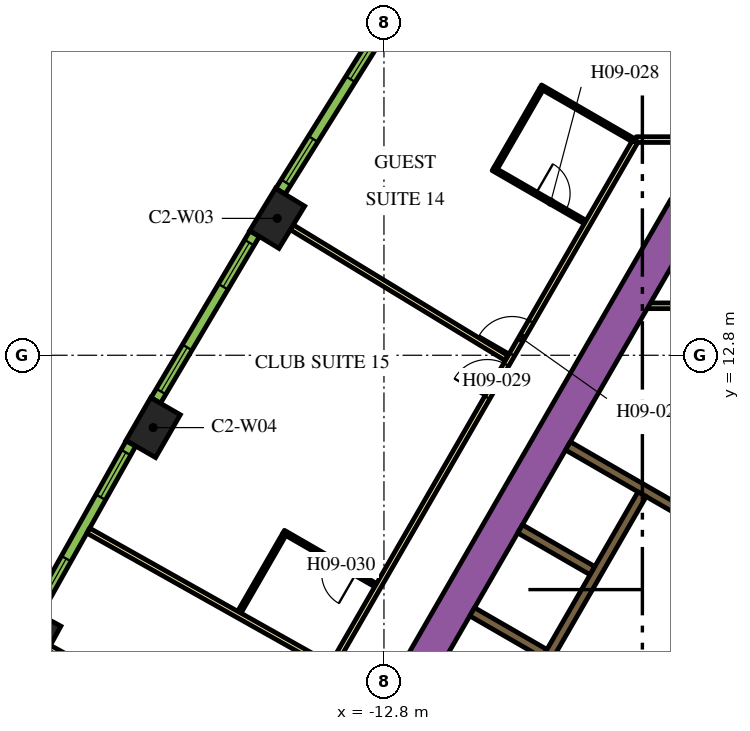
"""IFC4 building model, lengths in metres.
Left out: names, types, materials, properties, quantities, classifications, styles, units other than length and angle.
Written with IfcOpenShell. Run it as: python <this file> out.ifc"""

import sys

from ifc_helpers import new_model, si_unit, direction, frame, frame_2d, origin, origin_2d, place, context, subcontext, project, spatial, rectangle, extrude, element, fill, save


model = new_model("IFC4")
c1 = context("Model", 3, precision=1e-05, world=origin(), true_north=direction((0.0, 1.0)))
c2 = subcontext(c1, "Body", "Model", "MODEL_VIEW")
j1 = project(units=[si_unit("LENGTHUNIT", "METRE"), si_unit("PLANEANGLEUNIT", "RADIAN")], contexts=[c1])
p1 = place(None, origin())
s1 = spatial("IfcSite", under=j1, at=p1, CompositionType="ELEMENT")
p2 = place(p1, origin())
s2 = spatial("IfcBuilding", under=s1, at=p2, CompositionType="ELEMENT")
p3 = place(p2, frame((0.0, 0.0, 126.6)))
s3 = spatial("IfcBuildingStorey", under=s2, at=p3, CompositionType="ELEMENT", Elevation=126.6)
for number, where, z_axis, x_axis in (
    (1, (-15.609, 16.402, 0.0), (0.0, 0.0, 1.0), (-0.52, -0.854, 0.0)),
    (2, (-18.874, 10.897, 0.0), (0.0, 0.0, 1.0), (-0.5, -0.866, 0.0)),
    (3, (-22.009, 5.317, 0.0), (0.0, 0.0, 1.0), (-0.48, -0.877, 0.0)),
):
    element("IfcColumn", number, at=place(p3, frame(where, z_axis=z_axis, x_axis=x_axis)), inside=s3, PredefinedType="COLUMN", context=c2, shape_type="SweptSolid", body=[
        extrude(rectangle(XDim=1.3, YDim=0.9, at=origin_2d()), origin(), (0.0, 0.0, 1.0), 3.9),
    ])
p4 = place(p3, frame((-14.268, 0.387, 0.0), z_axis=(0.0, 0.0, 1.0), x_axis=(0.499994617707, 0.866028511231, 0.0)))
e4 = element("IfcWall", 4, at=p4, inside=s3, PredefinedType="SOLIDWALL", context=c2, shape_type="SweptSolid", body=[
    extrude(rectangle(XDim=18.817, YDim=0.9, at=frame_2d((9.409, 0.0))), origin(), (0.0, 0.0, 1.0), 3.9),
])
p5 = place(p3, frame((-8.06, -1.311, 0.0), z_axis=(0.0, 0.0, 1.0), x_axis=(0.50000273126, 0.866023826885, 0.0)))
e5 = element("IfcWall", 5, at=p5, inside=s3, PredefinedType="SOLIDWALL", context=c2, shape_type="SweptSolid", body=[
    extrude(rectangle(XDim=10.33, YDim=0.25, at=frame_2d((5.165, 0.0))), origin(), (0.0, 0.0, 1.0), 3.9),
])
for number, where, z_axis, x_axis in (
    (6, (-8.574, 4.95, 0.0), (0.0, 0.0, 1.0), (-0.866, 0.5, 0.0)),
    (7, (-7.314, 7.132, 0.0), (0.0, 0.0, 1.0), (-0.866, 0.5, 0.0)),
):
    element("IfcWall", number, at=place(p3, frame(where, z_axis=z_axis, x_axis=x_axis)), inside=s3, PredefinedType="SOLIDWALL", context=c2, shape_type="SweptSolid", body=[
        extrude(rectangle(XDim=2.2, YDim=0.25, at=frame_2d((1.1, 0.0))), origin(), (0.0, 0.0, 1.0), 3.9),
    ])
p6 = place(p3, frame((-7.959, 10.415, 0.0), z_axis=(0.0, 0.0, 1.0), x_axis=(0.866020958405, -0.500007699544, 0.0)))
e8 = element("IfcWall", 8, at=p6, inside=s3, PredefinedType="SOLIDWALL", context=c2, shape_type="SweptSolid", body=[
    extrude(rectangle(XDim=4.1, YDim=0.25, at=frame_2d((2.05, 0.0))), origin(), (0.0, 0.0, 1.0), 3.9),
])
p7 = place(p3, frame((-5.851, 14.102, 0.0), z_axis=(0.0, 0.0, 1.0), x_axis=(1.0, 0.0, 0.0)))
e9 = element("IfcWall", 9, at=p7, inside=s3, PredefinedType="PARTITIONING", context=c2, shape_type="SweptSolid", body=[
    extrude(rectangle(XDim=1.18, YDim=0.15, at=frame_2d((0.59, 0.0))), origin(), (0.0, 0.0, 1.0), 2.75),
])
p8 = place(p3, frame((-6.008, 9.144, 0.0), z_axis=(0.0, 0.0, 1.0), x_axis=(-0.500006956611, -0.866021387346, 0.0)))
e10 = element("IfcWall", 10, at=p8, inside=s3, PredefinedType="SOLIDWALL", context=c2, shape_type="SweptSolid", body=[
    extrude(rectangle(XDim=9.83, YDim=0.25, at=frame_2d((4.915, 0.0))), origin(), (0.0, 0.0, 1.0), 3.9),
])
p9 = place(p8, frame((6.985, 0.0, 0.0)))
e11 = element("IfcOpeningElement", 11, at=p9, cuts=e10, PredefinedType="OPENING", context=c2, shape_type="SweptSolid", body=[
    extrude(rectangle(XDim=0.9, YDim=2.1, at=frame_2d((0.45, 1.05))), frame((0.0, 0.135, 0.0), z_axis=(0.0, -1.0, 0.0), x_axis=(1.0, 0.0, 0.0)), (0.0, 0.0, 1.0), 0.27),
])
p10 = place(p3, frame((-0.898, 6.194, 0.0), z_axis=(0.0, 0.0, 1.0), x_axis=(-0.499996202215, -0.866027596426, 0.0)))
e12 = element("IfcWall", 12, at=p10, inside=s3, PredefinedType="SOLIDWALL", context=c2, shape_type="SweptSolid", body=[
    extrude(rectangle(XDim=9.83, YDim=0.25, at=frame_2d((4.915, 0.0))), origin(), (0.0, 0.0, 1.0), 3.9),
])
p11 = place(p10, frame((0.585, 0.0, 0.0)))
e13 = element("IfcOpeningElement", 13, at=p11, cuts=e12, PredefinedType="OPENING", context=c2, shape_type="SweptSolid", body=[
    extrude(rectangle(XDim=1.1, YDim=2.1, at=frame_2d((0.55, 1.05))), frame((0.0, 0.135, 0.0), z_axis=(0.0, -1.0, 0.0), x_axis=(1.0, 0.0, 0.0)), (0.0, 0.0, 1.0), 0.27),
])
p12 = place(p10, frame((3.105, 0.0, 0.0)))
e14 = element("IfcOpeningElement", 14, at=p12, cuts=e12, PredefinedType="OPENING", context=c2, shape_type="SweptSolid", body=[
    extrude(rectangle(XDim=1.1, YDim=2.1, at=frame_2d((0.55, 1.05))), frame((0.0, 0.135, 0.0), z_axis=(0.0, -1.0, 0.0), x_axis=(1.0, 0.0, 0.0)), (0.0, 0.0, 1.0), 0.27),
])
p13 = place(p10, frame((5.625, 0.0, 0.0)))
e15 = element("IfcOpeningElement", 15, at=p13, cuts=e12, PredefinedType="OPENING", context=c2, shape_type="SweptSolid", body=[
    extrude(rectangle(XDim=1.1, YDim=2.1, at=frame_2d((0.55, 1.05))), frame((0.0, 0.135, 0.0), z_axis=(0.0, -1.0, 0.0), x_axis=(1.0, 0.0, 0.0)), (0.0, 0.0, 1.0), 0.27),
])
p14 = place(p10, frame((8.145, 0.0, 0.0)))
e16 = element("IfcOpeningElement", 16, at=p14, cuts=e12, PredefinedType="OPENING", context=c2, shape_type="SweptSolid", body=[
    extrude(rectangle(XDim=1.1, YDim=2.1, at=frame_2d((0.55, 1.05))), frame((0.0, 0.135, 0.0), z_axis=(0.0, -1.0, 0.0), x_axis=(1.0, 0.0, 0.0)), (0.0, 0.0, 1.0), 0.27),
])
p15 = place(p3, frame((-6.163, 18.475, 0.0), z_axis=(0.0, 0.0, 1.0), x_axis=(1.0, 0.0, 0.0)))
e17 = element("IfcWall", 17, at=p15, inside=s3, PredefinedType="PARTITIONING", context=c2, shape_type="SweptSolid", body=[
    extrude(rectangle(XDim=5.258, YDim=0.15, at=frame_2d((2.629, 0.0))), origin(), (0.0, 0.0, 1.0), 2.75),
])
p16 = place(p3, frame((-19.081, -3.9, 0.0), z_axis=(0.0, 0.0, 1.0), x_axis=(0.499998313975, 0.866026377209, 0.0)))
e18 = element("IfcWall", 18, at=p16, inside=s3, PredefinedType="PARTITIONING", context=c2, shape_type="SweptSolid", body=[
    extrude(rectangle(XDim=25.766, YDim=0.15, at=frame_2d((12.883, 0.0))), origin(), (0.0, 0.0, 1.0), 2.75),
])
p17 = place(p16, frame((19.306, 0.0, 0.0)))
e19 = element("IfcOpeningElement", 19, at=p17, cuts=e18, PredefinedType="OPENING", context=c2, shape_type="SweptSolid", body=[
    extrude(rectangle(XDim=1.0, YDim=2.1, at=frame_2d((0.5, 1.05))), frame((0.0, 0.085, 0.0), z_axis=(0.0, -1.0, 0.0), x_axis=(1.0, 0.0, 0.0)), (0.0, 0.0, 1.0), 0.17),
])
p18 = place(p16, frame((18.0, 0.0, 0.0)))
e20 = element("IfcOpeningElement", 20, at=p18, cuts=e18, PredefinedType="OPENING", context=c2, shape_type="SweptSolid", body=[
    extrude(rectangle(XDim=1.0, YDim=2.1, at=frame_2d((0.5, 1.05))), frame((0.0, 0.085, 0.0), z_axis=(0.0, -1.0, 0.0), x_axis=(1.0, 0.0, 0.0)), (0.0, 0.0, 1.0), 0.17),
])
p19 = place(p16, frame((7.793, 0.0, 0.0)))
e21 = element("IfcOpeningElement", 21, at=p19, cuts=e18, PredefinedType="OPENING", context=c2, shape_type="SweptSolid", body=[
    extrude(rectangle(XDim=0.9, YDim=2.1, at=frame_2d((0.45, 1.05))), frame((0.0, 0.085, 0.0), z_axis=(0.0, -1.0, 0.0), x_axis=(1.0, 0.0, 0.0)), (0.0, 0.0, 1.0), 0.17),
])
p20 = place(p16, frame((4.674, 0.0, 0.0)))
e22 = element("IfcOpeningElement", 22, at=p20, cuts=e18, PredefinedType="OPENING", context=c2, shape_type="SweptSolid", body=[
    extrude(rectangle(XDim=0.9, YDim=2.1, at=frame_2d((0.45, 1.05))), frame((0.0, 0.085, 0.0), z_axis=(0.0, -1.0, 0.0), x_axis=(1.0, 0.0, 0.0)), (0.0, 0.0, 1.0), 0.17),
])
p21 = place(p16, frame((0.18, 0.0, 0.0)))
e23 = element("IfcOpeningElement", 23, at=p21, cuts=e18, PredefinedType="OPENING", context=c2, shape_type="SweptSolid", body=[
    extrude(rectangle(XDim=1.0, YDim=2.1, at=frame_2d((0.5, 1.05))), frame((0.0, 0.085, 0.0), z_axis=(0.0, -1.0, 0.0), x_axis=(1.0, 0.0, 0.0)), (0.0, 0.0, 1.0), 0.17),
])
p22 = place(p3, frame((-21.614, 5.102, 0.0), z_axis=(0.0, 0.0, 1.0), x_axis=(0.877484555087, -0.479604895287, 0.0)))
e24 = element("IfcWall", 24, at=p22, inside=s3, PredefinedType="PARTITIONING", context=c2, shape_type="SweptSolid", body=[
    extrude(rectangle(XDim=6.611, YDim=0.15, at=frame_2d((3.306, 0.0))), origin(), (0.0, 0.0, 1.0), 2.75),
])
p23 = place(p3, frame((-20.581, 8.185, 0.0), z_axis=(0.0, 0.0, 1.0), x_axis=(0.871820720803, -0.489825102233, 0.0)))
e25 = element("IfcWall", 25, at=p23, inside=s3, PredefinedType="PARTITIONING", context=c2, shape_type="SweptSolid", body=[
    extrude(rectangle(XDim=7.257, YDim=0.15, at=frame_2d((3.628, 0.0))), origin(), (0.0, 0.0, 1.0), 2.75),
])
p24 = place(p3, frame((-15.225, 16.167, 0.0), z_axis=(0.0, 0.0, 1.0), x_axis=(0.854088713274, -0.520127359266, 0.0)))
e26 = element("IfcWall", 26, at=p24, inside=s3, PredefinedType="PARTITIONING", context=c2, shape_type="SweptSolid", body=[
    extrude(rectangle(XDim=6.611, YDim=0.15, at=frame_2d((3.305, 0.0))), origin(), (0.0, 0.0, 1.0), 2.75),
])
p25 = place(p3, frame((-10.592, 24.589, 0.0), z_axis=(0.0, 0.0, 1.0), x_axis=(0.835337323748, -0.549737715236, 0.0)))
e27 = element("IfcWall", 27, at=p25, inside=s3, PredefinedType="PARTITIONING", context=c2, shape_type="SweptSolid", body=[
    extrude(rectangle(XDim=10.875, YDim=0.15, at=frame_2d((5.438, 0.0))), origin(), (0.0, 0.0, 1.0), 2.75),
])
p26 = place(p3, frame((-9.928, 17.704, 0.0), z_axis=(0.0, 0.0, 1.0), x_axis=(0.866034573852, -0.49998411664, 0.0)))
e28 = element("IfcWall", 28, at=p26, inside=s3, PredefinedType="PARTITIONING", context=c2, shape_type="SweptSolid", body=[
    extrude(rectangle(XDim=2.8, YDim=0.1, at=frame_2d((1.4, 0.0))), origin(), (0.0, 0.0, 1.0), 2.75),
])
p27 = place(p26, frame((1.3, 0.0, 0.0)))
e29 = element("IfcOpeningElement", 29, at=p27, cuts=e28, PredefinedType="OPENING", context=c2, shape_type="SweptSolid", body=[
    extrude(rectangle(XDim=0.9, YDim=2.1, at=frame_2d((0.45, 1.05))), frame((0.0, 0.06, 0.0), z_axis=(0.0, -1.0, 0.0), x_axis=(1.0, 0.0, 0.0)), (0.0, 0.0, 1.0), 0.12),
])
p28 = place(p3, frame((-9.86, 17.722, 0.0), z_axis=(0.0, 0.0, 1.0), x_axis=(0.500001309137, 0.866024647952, 0.0)))
e30 = element("IfcWall", 30, at=p28, inside=s3, PredefinedType="PARTITIONING", context=c2, shape_type="SweptSolid", body=[
    extrude(rectangle(XDim=2.4, YDim=0.1, at=frame_2d((1.2, 0.0))), origin(), (0.0, 0.0, 1.0), 2.75),
])
p29 = place(p3, frame((-6.253, 18.469, 0.0), z_axis=(0.0, 0.0, 1.0), x_axis=(-0.866034573852, 0.49998411664, 0.0)))
e31 = element("IfcWall", 31, at=p29, inside=s3, PredefinedType="PARTITIONING", context=c2, shape_type="SweptSolid", body=[
    extrude(rectangle(XDim=2.8, YDim=0.1, at=frame_2d((1.4, 0.0))), origin(), (0.0, 0.0, 1.0), 2.75),
])
p30 = place(p3, frame((-13.019, 6.751, 0.0), z_axis=(0.0, 0.0, 1.0), x_axis=(-0.866034573852, 0.49998411664, 0.0)))
e32 = element("IfcWall", 32, at=p30, inside=s3, PredefinedType="PARTITIONING", context=c2, shape_type="SweptSolid", body=[
    extrude(rectangle(XDim=2.8, YDim=0.1, at=frame_2d((1.4, 0.0))), origin(), (0.0, 0.0, 1.0), 2.75),
])
p31 = place(p30, frame((0.6, 0.0, 0.0)))
e33 = element("IfcOpeningElement", 33, at=p31, cuts=e32, PredefinedType="OPENING", context=c2, shape_type="SweptSolid", body=[
    extrude(rectangle(XDim=0.9, YDim=2.1, at=frame_2d((0.45, 1.05))), frame((0.0, 0.06, 0.0), z_axis=(0.0, -1.0, 0.0), x_axis=(1.0, 0.0, 0.0)), (0.0, 0.0, 1.0), 0.12),
])
p32 = place(p3, frame((-15.425, 8.083, 0.0), z_axis=(0.0, 0.0, 1.0), x_axis=(-0.500032858622, -0.866006432019, 0.0)))
e34 = element("IfcWall", 34, at=p32, inside=s3, PredefinedType="PARTITIONING", context=c2, shape_type="SweptSolid", body=[
    extrude(rectangle(XDim=2.36, YDim=0.1, at=frame_2d((1.18, 0.0))), origin(), (0.0, 0.0, 1.0), 2.75),
])
p33 = place(p3, frame((-12.82, 21.439, 0.0), z_axis=(0.0, 0.0, 1.0), x_axis=(-0.530072082134, -0.847952585787, 0.0)))
e35 = element("IfcWall", 35, at=p33, inside=s3, PredefinedType="SOLIDWALL", context=c2, shape_type="SweptSolid", body=[
    extrude(rectangle(XDim=5.1, YDim=0.29, at=frame_2d((2.55, 0.0))), origin(), (0.0, 0.0, 1.0), 3.65),
])
p34 = place(p33, frame((0.273, 0.0, 0.9)))
e36 = element("IfcOpeningElement", 36, at=p34, cuts=e35, PredefinedType="OPENING", context=c2, shape_type="SweptSolid", body=[
    extrude(rectangle(XDim=1.35, YDim=2.15, at=frame_2d((0.675, 1.075))), frame((0.0, 0.155, 0.0), z_axis=(0.0, -1.0, 0.0), x_axis=(1.0, 0.0, 0.0)), (0.0, 0.0, 1.0), 0.31),
])
p35 = place(p33, frame((3.478, 0.0, 0.9)))
e37 = element("IfcOpeningElement", 37, at=p35, cuts=e35, PredefinedType="OPENING", context=c2, shape_type="SweptSolid", body=[
    extrude(rectangle(XDim=1.35, YDim=2.15, at=frame_2d((0.675, 1.075))), frame((0.0, 0.155, 0.0), z_axis=(0.0, -1.0, 0.0), x_axis=(1.0, 0.0, 0.0)), (0.0, 0.0, 1.0), 0.31),
])
p36 = place(p3, frame((-16.203, 15.998, 0.0), z_axis=(0.0, 0.0, 1.0), x_axis=(-0.510054281659, -0.860142214847, 0.0)))
e38 = element("IfcWall", 38, at=p36, inside=s3, PredefinedType="SOLIDWALL", context=c2, shape_type="SweptSolid", body=[
    extrude(rectangle(XDim=5.101, YDim=0.29, at=frame_2d((2.55, 0.0))), origin(), (0.0, 0.0, 1.0), 3.65),
])
p37 = place(p36, frame((0.273, 0.0, 0.9)))
e39 = element("IfcOpeningElement", 39, at=p37, cuts=e38, PredefinedType="OPENING", context=c2, shape_type="SweptSolid", body=[
    extrude(rectangle(XDim=1.35, YDim=2.15, at=frame_2d((0.675, 1.075))), frame((0.0, 0.155, 0.0), z_axis=(0.0, -1.0, 0.0), x_axis=(1.0, 0.0, 0.0)), (0.0, 0.0, 1.0), 0.31),
])
p38 = place(p36, frame((3.478, 0.0, 0.9)))
e40 = element("IfcOpeningElement", 40, at=p38, cuts=e38, PredefinedType="OPENING", context=c2, shape_type="SweptSolid", body=[
    extrude(rectangle(XDim=1.35, YDim=2.15, at=frame_2d((0.675, 1.075))), frame((0.0, 0.155, 0.0), z_axis=(0.0, -1.0, 0.0), x_axis=(1.0, 0.0, 0.0)), (0.0, 0.0, 1.0), 0.31),
])
p39 = place(p3, frame((-19.458, 10.48, 0.0), z_axis=(0.0, 0.0, 1.0), x_axis=(-0.48983164787, -0.87181704316, 0.0)))
e41 = element("IfcWall", 41, at=p39, inside=s3, PredefinedType="SOLIDWALL", context=c2, shape_type="SweptSolid", body=[
    extrude(rectangle(XDim=5.1, YDim=0.29, at=frame_2d((2.55, 0.0))), origin(), (0.0, 0.0, 1.0), 3.65),
])
p40 = place(p39, frame((0.272, 0.0, 0.9)))
e42 = element("IfcOpeningElement", 42, at=p40, cuts=e41, PredefinedType="OPENING", context=c2, shape_type="SweptSolid", body=[
    extrude(rectangle(XDim=1.35, YDim=2.15, at=frame_2d((0.675, 1.075))), frame((0.0, 0.155, 0.0), z_axis=(0.0, -1.0, 0.0), x_axis=(1.0, 0.0, 0.0)), (0.0, 0.0, 1.0), 0.31),
])
p41 = place(p39, frame((3.478, 0.0, 0.9)))
e43 = element("IfcOpeningElement", 43, at=p41, cuts=e41, PredefinedType="OPENING", context=c2, shape_type="SweptSolid", body=[
    extrude(rectangle(XDim=1.35, YDim=2.15, at=frame_2d((0.675, 1.075))), frame((0.0, 0.155, 0.0), z_axis=(0.0, -1.0, 0.0), x_axis=(1.0, 0.0, 0.0)), (0.0, 0.0, 1.0), 0.31),
])
p42 = place(p17, origin())
e44 = element("IfcDoor", 44, at=p42, inside=s3, OperationType="SINGLE_SWING_LEFT", PredefinedType="DOOR", context=c2, shape_type="SweptSolid", body=[
    extrude(rectangle(XDim=1.0, YDim=2.1, at=frame_2d((0.5, 1.05))), frame((0.0, 0.025, 0.0), z_axis=(0.0, -1.0, 0.0), x_axis=(1.0, 0.0, 0.0)), (0.0, 0.0, 1.0), 0.05),
])
fill(e19, e44)
p43 = place(p27, origin())
e45 = element("IfcDoor", 45, at=p43, inside=s3, OperationType="SINGLE_SWING_LEFT", PredefinedType="DOOR", context=c2, shape_type="SweptSolid", body=[
    extrude(rectangle(XDim=0.9, YDim=2.1, at=frame_2d((0.45, 1.05))), frame((0.0, 0.025, 0.0), z_axis=(0.0, -1.0, 0.0), x_axis=(1.0, 0.0, 0.0)), (0.0, 0.0, 1.0), 0.05),
])
fill(e29, e45)
p44 = place(p18, origin())
e46 = element("IfcDoor", 46, at=p44, inside=s3, OperationType="SINGLE_SWING_RIGHT", PredefinedType="DOOR", context=c2, shape_type="SweptSolid", body=[
    extrude(rectangle(XDim=1.0, YDim=2.1, at=frame_2d((0.5, 1.05))), frame((0.0, 0.025, 0.0), z_axis=(0.0, -1.0, 0.0), x_axis=(1.0, 0.0, 0.0)), (0.0, 0.0, 1.0), 0.05),
])
fill(e20, e46)
p45 = place(p31, origin())
e47 = element("IfcDoor", 47, at=p45, inside=s3, OperationType="SINGLE_SWING_RIGHT", PredefinedType="DOOR", context=c2, shape_type="SweptSolid", body=[
    extrude(rectangle(XDim=0.9, YDim=2.1, at=frame_2d((0.45, 1.05))), frame((0.0, 0.025, 0.0), z_axis=(0.0, -1.0, 0.0), x_axis=(1.0, 0.0, 0.0)), (0.0, 0.0, 1.0), 0.05),
])
fill(e33, e47)
p46 = place(p34, origin())
e48 = element("IfcWindow", 48, at=p46, inside=s3, PartitioningType="DOUBLE_PANEL_VERTICAL", PredefinedType="WINDOW", context=c2, shape_type="SweptSolid", body=[
    extrude(rectangle(XDim=1.35, YDim=2.15, at=frame_2d((0.675, 1.075))), frame((0.0, 0.015, 0.0), z_axis=(0.0, -1.0, 0.0), x_axis=(1.0, 0.0, 0.0)), (0.0, 0.0, 1.0), 0.06),
])
fill(e36, e48)
p47 = place(p35, origin())
e49 = element("IfcWindow", 49, at=p47, inside=s3, PartitioningType="DOUBLE_PANEL_VERTICAL", PredefinedType="WINDOW", context=c2, shape_type="SweptSolid", body=[
    extrude(rectangle(XDim=1.35, YDim=2.15, at=frame_2d((0.675, 1.075))), frame((0.0, 0.015, 0.0), z_axis=(0.0, -1.0, 0.0), x_axis=(1.0, 0.0, 0.0)), (0.0, 0.0, 1.0), 0.06),
])
fill(e37, e49)
p48 = place(p37, origin())
e50 = element("IfcWindow", 50, at=p48, inside=s3, PartitioningType="DOUBLE_PANEL_VERTICAL", PredefinedType="WINDOW", context=c2, shape_type="SweptSolid", body=[
    extrude(rectangle(XDim=1.35, YDim=2.15, at=frame_2d((0.675, 1.075))), frame((0.0, 0.015, 0.0), z_axis=(0.0, -1.0, 0.0), x_axis=(1.0, 0.0, 0.0)), (0.0, 0.0, 1.0), 0.06),
])
fill(e39, e50)
p49 = place(p38, origin())
e51 = element("IfcWindow", 51, at=p49, inside=s3, PartitioningType="DOUBLE_PANEL_VERTICAL", PredefinedType="WINDOW", context=c2, shape_type="SweptSolid", body=[
    extrude(rectangle(XDim=1.35, YDim=2.15, at=frame_2d((0.675, 1.075))), frame((0.0, 0.015, 0.0), z_axis=(0.0, -1.0, 0.0), x_axis=(1.0, 0.0, 0.0)), (0.0, 0.0, 1.0), 0.06),
])
fill(e40, e51)
p50 = place(p40, origin())
e52 = element("IfcWindow", 52, at=p50, inside=s3, PartitioningType="DOUBLE_PANEL_VERTICAL", PredefinedType="WINDOW", context=c2, shape_type="SweptSolid", body=[
    extrude(rectangle(XDim=1.35, YDim=2.15, at=frame_2d((0.675, 1.075))), frame((0.0, 0.015, 0.0), z_axis=(0.0, -1.0, 0.0), x_axis=(1.0, 0.0, 0.0)), (0.0, 0.0, 1.0), 0.06),
])
fill(e42, e52)
p51 = place(p41, origin())
e53 = element("IfcWindow", 53, at=p51, inside=s3, PartitioningType="DOUBLE_PANEL_VERTICAL", PredefinedType="WINDOW", context=c2, shape_type="SweptSolid", body=[
    extrude(rectangle(XDim=1.35, YDim=2.15, at=frame_2d((0.675, 1.075))), frame((0.0, 0.015, 0.0), z_axis=(0.0, -1.0, 0.0), x_axis=(1.0, 0.0, 0.0)), (0.0, 0.0, 1.0), 0.06),
])
fill(e43, e53)
save(model, sys.argv[1])
